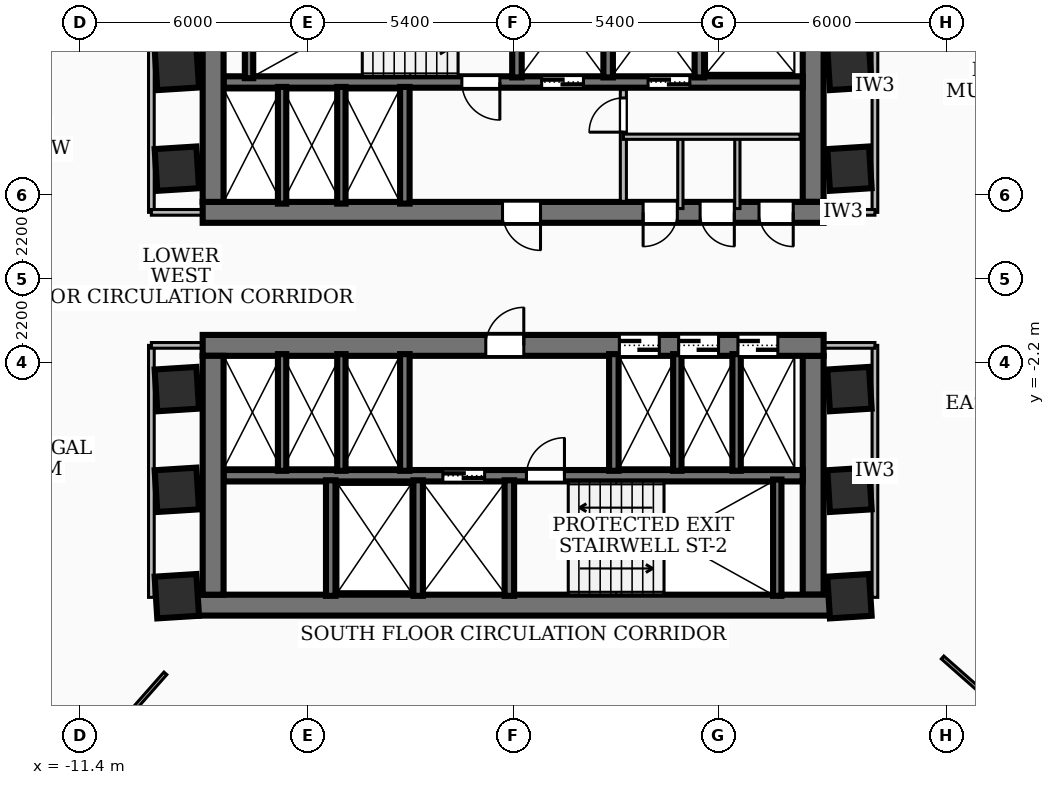
"""IFC4 building model, lengths in metres.
Left out: names, types, materials, properties, quantities, classifications, styles, units other than length and angle.
Written with IfcOpenShell. Run it as: python <this file> out.ifc"""

import sys

from ifc_helpers import new_model, si_unit, direction, frame, frame_2d, origin, origin_2d, place, context, subcontext, project, spatial, rectangle, extrude, element, fill, save


model = new_model("IFC4")
c1 = context("Model", 3, precision=1e-05, world=origin(), true_north=direction((0.0, 1.0)))
c2 = subcontext(c1, "Body", "Model", "MODEL_VIEW")
j1 = project(units=[si_unit("LENGTHUNIT", "METRE"), si_unit("PLANEANGLEUNIT", "RADIAN")], contexts=[c1])
p1 = place(None, origin())
s1 = spatial("IfcSite", under=j1, at=p1, CompositionType="ELEMENT")
p2 = place(p1, origin())
s2 = spatial("IfcBuilding", under=s1, at=p2, CompositionType="ELEMENT")
p3 = place(p2, frame((0.0, 0.0, 49.68)))
s3 = spatial("IfcBuildingStorey", under=s2, at=p3, CompositionType="ELEMENT", Elevation=49.68)
p4 = place(p3, frame((8.17, 1.75, 0.0), z_axis=(0.0, 0.0, 1.0), x_axis=(-1.0, 0.0, 0.0)))
e1 = element("IfcWall", 1, at=p4, inside=s3, PredefinedType="SHEAR", context=c2, shape_type="SweptSolid", body=[
    extrude(rectangle(XDim=16.34, YDim=0.55, at=frame_2d((8.17, 0.0))), origin(), (0.0, 0.0, 1.0), 3.32),
])
p5 = place(p4, frame((7.45, 0.0, 0.0)))
e2 = element("IfcOpeningElement", 2, at=p5, cuts=e1, PredefinedType="OPENING", context=c2, shape_type="SweptSolid", body=[
    extrude(rectangle(XDim=1.0, YDim=2.1, at=frame_2d((0.5, 1.05))), frame((0.0, 0.285, 0.0), z_axis=(0.0, -1.0, 0.0), x_axis=(1.0, 0.0, 0.0)), (0.0, 0.0, 1.0), 0.57),
])
p6 = place(p4, frame((3.85, 0.0, 0.0)))
e3 = element("IfcOpeningElement", 3, at=p6, cuts=e1, PredefinedType="OPENING", context=c2, shape_type="SweptSolid", body=[
    extrude(rectangle(XDim=0.9, YDim=2.06, at=frame_2d((0.45, 1.03))), frame((0.0, 0.285, 0.0), z_axis=(0.0, -1.0, 0.0), x_axis=(1.0, 0.0, 0.0)), (0.0, 0.0, 1.0), 0.57),
])
p7 = place(p4, frame((2.35, 0.0, 0.0)))
e4 = element("IfcOpeningElement", 4, at=p7, cuts=e1, PredefinedType="OPENING", context=c2, shape_type="SweptSolid", body=[
    extrude(rectangle(XDim=0.9, YDim=2.06, at=frame_2d((0.45, 1.03))), frame((0.0, 0.285, 0.0), z_axis=(0.0, -1.0, 0.0), x_axis=(1.0, 0.0, 0.0)), (0.0, 0.0, 1.0), 0.57),
])
p8 = place(p4, frame((0.8, 0.0, 0.0)))
e5 = element("IfcOpeningElement", 5, at=p8, cuts=e1, PredefinedType="OPENING", context=c2, shape_type="SweptSolid", body=[
    extrude(rectangle(XDim=0.9, YDim=2.06, at=frame_2d((0.45, 1.03))), frame((0.0, 0.285, 0.0), z_axis=(0.0, -1.0, 0.0), x_axis=(1.0, 0.0, 0.0)), (0.0, 0.0, 1.0), 0.57),
])
for number, where, z_axis, x_axis in (
    (6, (-7.895, 2.025, 0.0), (0.0, 0.0, 1.0), (0.0, 1.0, 0.0)),
    (7, (7.895, 8.31, 0.0), (0.0, 0.0, 1.0), (0.0, -1.0, 0.0)),
):
    element("IfcWall", number, at=place(p3, frame(where, z_axis=z_axis, x_axis=x_axis)), inside=s3, PredefinedType="SHEAR", context=c2, shape_type="SweptSolid", body=[
        extrude(rectangle(XDim=6.285, YDim=0.55, at=frame_2d((3.143, 0.0))), origin(), (0.0, 0.0, 1.0), 3.32),
    ])
p9 = place(p3, frame((7.62, 5.18, 0.0), z_axis=(0.0, 0.0, 1.0), x_axis=(-1.0, 0.0, 0.0)))
e8 = element("IfcWall", 8, at=p9, inside=s3, PredefinedType="SOLIDWALL", context=c2, shape_type="SweptSolid", body=[
    extrude(rectangle(XDim=15.24, YDim=0.3, at=frame_2d((7.62, 0.0))), origin(), (0.0, 0.0, 1.0), 3.32),
])
p10 = place(p9, frame((5.77, 0.0, 0.0)))
e9 = element("IfcOpeningElement", 9, at=p10, cuts=e8, PredefinedType="OPENING", context=c2, shape_type="SweptSolid", body=[
    extrude(rectangle(XDim=1.1, YDim=2.15, at=frame_2d((0.55, 1.075))), frame((0.0, 0.16, 0.0), z_axis=(0.0, -1.0, 0.0), x_axis=(1.0, 0.0, 0.0)), (0.0, 0.0, 1.0), 0.32),
])
p11 = place(p9, frame((2.97, 0.0, 0.0)))
e10 = element("IfcOpeningElement", 10, at=p11, cuts=e8, PredefinedType="OPENING", context=c2, shape_type="SweptSolid", body=[
    extrude(rectangle(XDim=1.1, YDim=2.15, at=frame_2d((0.55, 1.075))), frame((0.0, 0.16, 0.0), z_axis=(0.0, -1.0, 0.0), x_axis=(1.0, 0.0, 0.0)), (0.0, 0.0, 1.0), 0.32),
])
p12 = place(p9, frame((7.97, 0.0, 0.0)))
e11 = element("IfcOpeningElement", 11, at=p12, cuts=e8, PredefinedType="OPENING", context=c2, shape_type="SweptSolid", body=[
    extrude(rectangle(XDim=1.0, YDim=2.1, at=frame_2d((0.5, 1.05))), frame((0.0, 0.16, 0.0), z_axis=(0.0, -1.0, 0.0), x_axis=(1.0, 0.0, 0.0)), (0.0, 0.0, 1.0), 0.32),
])
p13 = place(p3, frame((8.78, -8.585, 0.0), z_axis=(0.0, 0.0, 1.0), x_axis=(-1.0, 0.0, 0.0)))
e12 = element("IfcWall", 12, at=p13, inside=s3, PredefinedType="SHEAR", context=c2, shape_type="SweptSolid", body=[
    extrude(rectangle(XDim=17.56, YDim=0.55, at=frame_2d((8.78, 0.0))), origin(), (0.0, 0.0, 1.0), 3.32),
])
p14 = place(p3, frame((-8.17, -1.75, 0.0), z_axis=(0.0, 0.0, 1.0), x_axis=(1.0, 0.0, 0.0)))
e13 = element("IfcWall", 13, at=p14, inside=s3, PredefinedType="SHEAR", context=c2, shape_type="SweptSolid", body=[
    extrude(rectangle(XDim=16.34, YDim=0.55, at=frame_2d((8.17, 0.0))), origin(), (0.0, 0.0, 1.0), 3.32),
])
p15 = place(p14, frame((7.45, 0.0, 0.0)))
e14 = element("IfcOpeningElement", 14, at=p15, cuts=e13, PredefinedType="OPENING", context=c2, shape_type="SweptSolid", body=[
    extrude(rectangle(XDim=1.0, YDim=2.1, at=frame_2d((0.5, 1.05))), frame((0.0, 0.285, 0.0), z_axis=(0.0, -1.0, 0.0), x_axis=(1.0, 0.0, 0.0)), (0.0, 0.0, 1.0), 0.57),
])
p16 = place(p14, frame((10.965, 0.0, 0.0)))
e15 = element("IfcOpeningElement", 15, at=p16, cuts=e13, PredefinedType="OPENING", context=c2, shape_type="SweptSolid", body=[
    extrude(rectangle(XDim=1.05, YDim=2.15, at=frame_2d((0.525, 1.075))), frame((0.0, 0.285, 0.0), z_axis=(0.0, -1.0, 0.0), x_axis=(1.0, 0.0, 0.0)), (0.0, 0.0, 1.0), 0.57),
])
p17 = place(p14, frame((12.525, 0.0, 0.0)))
e16 = element("IfcOpeningElement", 16, at=p17, cuts=e13, PredefinedType="OPENING", context=c2, shape_type="SweptSolid", body=[
    extrude(rectangle(XDim=1.05, YDim=2.15, at=frame_2d((0.525, 1.075))), frame((0.0, 0.285, 0.0), z_axis=(0.0, -1.0, 0.0), x_axis=(1.0, 0.0, 0.0)), (0.0, 0.0, 1.0), 0.57),
])
p18 = place(p14, frame((14.085, 0.0, 0.0)))
e17 = element("IfcOpeningElement", 17, at=p18, cuts=e13, PredefinedType="OPENING", context=c2, shape_type="SweptSolid", body=[
    extrude(rectangle(XDim=1.05, YDim=2.15, at=frame_2d((0.525, 1.075))), frame((0.0, 0.285, 0.0), z_axis=(0.0, -1.0, 0.0), x_axis=(1.0, 0.0, 0.0)), (0.0, 0.0, 1.0), 0.57),
])
for number, where, z_axis, x_axis in (
    (18, (-7.895, -8.31, 0.0), (0.0, 0.0, 1.0), (0.0, 1.0, 0.0)),
    (19, (7.895, -2.025, 0.0), (0.0, 0.0, 1.0), (0.0, -1.0, 0.0)),
):
    element("IfcWall", number, at=place(p3, frame(where, z_axis=z_axis, x_axis=x_axis)), inside=s3, PredefinedType="SHEAR", context=c2, shape_type="SweptSolid", body=[
        extrude(rectangle(XDim=6.285, YDim=0.55, at=frame_2d((3.143, 0.0))), origin(), (0.0, 0.0, 1.0), 3.32),
    ])
p19 = place(p3, frame((-7.62, -5.18, 0.0), z_axis=(0.0, 0.0, 1.0), x_axis=(1.0, 0.0, 0.0)))
e20 = element("IfcWall", 20, at=p19, inside=s3, PredefinedType="SOLIDWALL", context=c2, shape_type="SweptSolid", body=[
    extrude(rectangle(XDim=15.24, YDim=0.3, at=frame_2d((7.62, 0.0))), origin(), (0.0, 0.0, 1.0), 3.32),
])
p20 = place(p19, frame((5.77, 0.0, 0.0)))
e21 = element("IfcOpeningElement", 21, at=p20, cuts=e20, PredefinedType="OPENING", context=c2, shape_type="SweptSolid", body=[
    extrude(rectangle(XDim=1.1, YDim=2.15, at=frame_2d((0.55, 1.075))), frame((0.0, 0.16, 0.0), z_axis=(0.0, -1.0, 0.0), x_axis=(1.0, 0.0, 0.0)), (0.0, 0.0, 1.0), 0.32),
])
p21 = place(p19, frame((7.97, 0.0, 0.0)))
e22 = element("IfcOpeningElement", 22, at=p21, cuts=e20, PredefinedType="OPENING", context=c2, shape_type="SweptSolid", body=[
    extrude(rectangle(XDim=1.0, YDim=2.1, at=frame_2d((0.5, 1.05))), frame((0.0, 0.16, 0.0), z_axis=(0.0, -1.0, 0.0), x_axis=(1.0, 0.0, 0.0)), (0.0, 0.0, 1.0), 0.32),
])
for number, where, z_axis, x_axis in (
    (23, (-6.95, 5.28, 0.0), (0.0, 0.0, 1.0), (0.0, 1.0, 0.0)),
    (24, (6.95, -8.34, 0.0), (0.0, 0.0, 1.0), (0.0, 1.0, 0.0)),
):
    element("IfcWall", number, at=place(p3, frame(where, z_axis=z_axis, x_axis=x_axis)), inside=s3, PredefinedType="SOLIDWALL", context=c2, shape_type="SweptSolid", body=[
        extrude(rectangle(XDim=3.06, YDim=0.22, at=frame_2d((1.53, 0.0))), origin(), (0.0, 0.0, 1.0), 3.32),
    ])
for number, where, z_axis, x_axis in (
    (25, (0.1, 5.3, 0.0), (0.0, 0.0, 1.0), (0.0, 1.0, 0.0)),
    (26, (2.5, 5.3, 0.0), (0.0, 0.0, 1.0), (0.0, 1.0, 0.0)),
    (27, (4.9, 5.3, 0.0), (0.0, 0.0, 1.0), (0.0, 1.0, 0.0)),
):
    element("IfcWall", number, at=place(p3, frame(where, z_axis=z_axis, x_axis=x_axis)), inside=s3, PredefinedType="SOLIDWALL", context=c2, shape_type="SweptSolid", body=[
        extrude(rectangle(XDim=3.04, YDim=0.25, at=frame_2d((1.52, 0.0))), origin(), (0.0, 0.0, 1.0), 3.32),
    ])
p22 = place(p3, frame((-2.85, 1.98, 0.0), z_axis=(0.0, 0.0, 1.0), x_axis=(0.0, 1.0, 0.0)))
e28 = element("IfcWall", 28, at=p22, inside=s3, PredefinedType="SOLIDWALL", context=c2, shape_type="SweptSolid", body=[
    extrude(rectangle(XDim=3.07, YDim=0.25, at=frame_2d((1.535, 0.0))), origin(), (0.0, 0.0, 1.0), 3.32),
])
for number, where, z_axis, x_axis in (
    (29, (-0.1, -8.34, 0.0), (0.0, 0.0, 1.0), (0.0, 1.0, 0.0)),
    (30, (-2.5, -8.34, 0.0), (0.0, 0.0, 1.0), (0.0, 1.0, 0.0)),
    (31, (-4.8, -8.34, 0.0), (0.0, 0.0, 1.0), (0.0, 1.0, 0.0)),
):
    element("IfcWall", number, at=place(p3, frame(where, z_axis=z_axis, x_axis=x_axis)), inside=s3, PredefinedType="SOLIDWALL", context=c2, shape_type="SweptSolid", body=[
        extrude(rectangle(XDim=3.04, YDim=0.25, at=frame_2d((1.52, 0.0))), origin(), (0.0, 0.0, 1.0), 3.32),
    ])
for number, where, z_axis, x_axis in (
    (32, (-2.85, -5.05, 0.0), (0.0, 0.0, 1.0), (0.0, 1.0, 0.0)),
    (33, (2.65, -5.05, 0.0), (0.0, 0.0, 1.0), (0.0, 1.0, 0.0)),
):
    element("IfcWall", number, at=place(p3, frame(where, z_axis=z_axis, x_axis=x_axis)), inside=s3, PredefinedType="SOLIDWALL", context=c2, shape_type="SweptSolid", body=[
        extrude(rectangle(XDim=3.07, YDim=0.25, at=frame_2d((1.535, 0.0))), origin(), (0.0, 0.0, 1.0), 3.32),
    ])
for number, where, z_axis, x_axis in (
    (34, (-6.08, 1.98, 0.0), (0.0, 0.0, 1.0), (0.0, 1.0, 0.0)),
    (35, (-4.52, 1.98, 0.0), (0.0, 0.0, 1.0), (0.0, 1.0, 0.0)),
    (36, (4.32, -5.05, 0.0), (0.0, 0.0, 1.0), (0.0, 1.0, 0.0)),
    (37, (5.88, -5.05, 0.0), (0.0, 0.0, 1.0), (0.0, 1.0, 0.0)),
    (38, (-6.08, -5.05, 0.0), (0.0, 0.0, 1.0), (0.0, 1.0, 0.0)),
    (39, (-4.52, -5.05, 0.0), (0.0, 0.0, 1.0), (0.0, 1.0, 0.0)),
):
    element("IfcWall", number, at=place(p3, frame(where, z_axis=z_axis, x_axis=x_axis)), inside=s3, PredefinedType="SOLIDWALL", context=c2, shape_type="SweptSolid", body=[
        extrude(rectangle(XDim=3.07, YDim=0.22, at=frame_2d((1.535, 0.0))), origin(), (0.0, 0.0, 1.0), 3.32),
    ])
for number, where, z_axis, x_axis in (
    (40, (-8.85, -5.55, 0.0), (0.0, 0.0, 1.0), (0.998, 0.063, 0.0)),
    (41, (-8.85, -2.9, 0.0), (0.0, 0.0, 1.0), (0.998, 0.063, 0.0)),
    (42, (-8.85, 2.9, 0.0), (0.0, 0.0, 1.0), (0.998, 0.063, 0.0)),
    (43, (-8.85, 5.55, 0.0), (0.0, 0.0, 1.0), (0.998, 0.063, 0.0)),
    (44, (8.85, -5.55, 0.0), (0.0, 0.0, 1.0), (0.998, 0.063, 0.0)),
    (45, (8.85, -2.9, 0.0), (0.0, 0.0, 1.0), (0.998, 0.063, 0.0)),
    (46, (8.85, 2.9, 0.0), (0.0, 0.0, 1.0), (0.998, 0.063, 0.0)),
    (47, (8.85, 5.55, 0.0), (0.0, 0.0, 1.0), (0.998, 0.063, 0.0)),
    (48, (8.85, -8.35, 0.0), (0.0, 0.0, 1.0), (0.998, 0.063, 0.0)),
    (49, (-8.85, -8.35, 0.0), (0.0, 0.0, 1.0), (0.998, 0.063, 0.0)),
):
    element("IfcColumn", number, at=place(p3, frame(where, z_axis=z_axis, x_axis=x_axis)), inside=s3, PredefinedType="COLUMN", context=c2, shape_type="SweptSolid", body=[
        extrude(rectangle(XDim=1.1, YDim=1.1, at=origin_2d()), origin(), (0.0, 0.0, 1.0), 3.6),
    ])
p23 = place(p3, frame((2.9, 2.04, 0.0), z_axis=(0.0, 0.0, 1.0), x_axis=(0.0, 1.0, 0.0)))
e50 = element("IfcWall", 50, at=p23, inside=s3, PredefinedType="PARTITIONING", context=c2, shape_type="SweptSolid", body=[
    extrude(rectangle(XDim=2.94, YDim=0.16, at=frame_2d((1.47, 0.0))), origin(), (0.0, 0.0, 1.0), 2.385),
])
p24 = place(p23, frame((1.82, 0.0, 0.0)))
e51 = element("IfcOpeningElement", 51, at=p24, cuts=e50, PredefinedType="OPENING", context=c2, shape_type="SweptSolid", body=[
    extrude(rectangle(XDim=0.9, YDim=2.06, at=frame_2d((0.45, 1.03))), frame((0.0, 0.09, 0.0), z_axis=(0.0, -1.0, 0.0), x_axis=(1.0, 0.0, 0.0)), (0.0, 0.0, 1.0), 0.18),
])
p25 = place(p3, frame((2.9, 3.74, 0.0), z_axis=(0.0, 0.0, 1.0), x_axis=(1.0, 0.0, 0.0)))
e52 = element("IfcWall", 52, at=p25, inside=s3, PredefinedType="PARTITIONING", context=c2, shape_type="SweptSolid", body=[
    extrude(rectangle(XDim=4.65, YDim=0.138, at=frame_2d((2.325, 0.0))), origin(), (0.0, 0.0, 1.0), 3.32),
])
for number, where, z_axis, x_axis in (
    (53, (4.4, 1.85, 0.0), (0.0, 0.0, 1.0), (0.0, 1.0, 0.0)),
    (54, (5.9, 1.85, 0.0), (0.0, 0.0, 1.0), (0.0, 1.0, 0.0)),
):
    element("IfcWall", number, at=place(p3, frame(where, z_axis=z_axis, x_axis=x_axis)), inside=s3, PredefinedType="PARTITIONING", context=c2, shape_type="SweptSolid", body=[
        extrude(rectangle(XDim=1.89, YDim=0.138, at=frame_2d((0.945, 0.0))), origin(), (0.0, 0.0, 1.0), 2.385),
    ])
p26 = place(p3, frame((-9.52, 1.75, 0.0), z_axis=(0.0, 0.0, 1.0), x_axis=(0.0, 1.0, 0.0)))
e55 = element("IfcWall", 55, at=p26, inside=s3, PredefinedType="PARTITIONING", context=c2, shape_type="SweptSolid", body=[
    extrude(rectangle(XDim=6.63, YDim=0.15, at=frame_2d((3.315, 0.0))), origin(), (0.0, 0.0, 1.0), 2.401),
])
p27 = place(p3, frame((-7.85, 1.75, 0.0), z_axis=(0.0, 0.0, 1.0), x_axis=(-1.0, 0.0, 0.0)))
e56 = element("IfcWall", 56, at=p27, inside=s3, PredefinedType="PARTITIONING", context=c2, shape_type="SweptSolid", body=[
    extrude(rectangle(XDim=1.67, YDim=0.15, at=frame_2d((0.835, 0.0))), origin(), (0.0, 0.0, 1.0), 2.385),
])
p28 = place(p3, frame((-9.52, -8.38, 0.0), z_axis=(0.0, 0.0, 1.0), x_axis=(0.0, 1.0, 0.0)))
e57 = element("IfcWall", 57, at=p28, inside=s3, PredefinedType="PARTITIONING", context=c2, shape_type="SweptSolid", body=[
    extrude(rectangle(XDim=6.63, YDim=0.15, at=frame_2d((3.315, 0.0))), origin(), (0.0, 0.0, 1.0), 2.401),
])
p29 = place(p3, frame((-7.85, -1.75, 0.0), z_axis=(0.0, 0.0, 1.0), x_axis=(-1.0, 0.0, 0.0)))
e58 = element("IfcWall", 58, at=p29, inside=s3, PredefinedType="PARTITIONING", context=c2, shape_type="SweptSolid", body=[
    extrude(rectangle(XDim=1.67, YDim=0.15, at=frame_2d((0.835, 0.0))), origin(), (0.0, 0.0, 1.0), 2.385),
])
p30 = place(p3, frame((9.52, 1.75, 0.0), z_axis=(0.0, 0.0, 1.0), x_axis=(0.0, 1.0, 0.0)))
e59 = element("IfcWall", 59, at=p30, inside=s3, PredefinedType="PARTITIONING", context=c2, shape_type="SweptSolid", body=[
    extrude(rectangle(XDim=6.63, YDim=0.15, at=frame_2d((3.315, 0.0))), origin(), (0.0, 0.0, 1.0), 2.401),
])
p31 = place(p3, frame((7.85, 1.75, 0.0), z_axis=(0.0, 0.0, 1.0), x_axis=(1.0, 0.0, 0.0)))
e60 = element("IfcWall", 60, at=p31, inside=s3, PredefinedType="PARTITIONING", context=c2, shape_type="SweptSolid", body=[
    extrude(rectangle(XDim=1.67, YDim=0.15, at=frame_2d((0.835, 0.0))), origin(), (0.0, 0.0, 1.0), 2.385),
])
p32 = place(p3, frame((9.52, -8.38, 0.0), z_axis=(0.0, 0.0, 1.0), x_axis=(0.0, 1.0, 0.0)))
e61 = element("IfcWall", 61, at=p32, inside=s3, PredefinedType="PARTITIONING", context=c2, shape_type="SweptSolid", body=[
    extrude(rectangle(XDim=6.63, YDim=0.15, at=frame_2d((3.315, 0.0))), origin(), (0.0, 0.0, 1.0), 2.401),
])
p33 = place(p3, frame((7.85, -1.75, 0.0), z_axis=(0.0, 0.0, 1.0), x_axis=(1.0, 0.0, 0.0)))
e62 = element("IfcWall", 62, at=p33, inside=s3, PredefinedType="PARTITIONING", context=c2, shape_type="SweptSolid", body=[
    extrude(rectangle(XDim=1.67, YDim=0.15, at=frame_2d((0.835, 0.0))), origin(), (0.0, 0.0, 1.0), 2.385),
])
p34 = place(p3, frame((-9.151, -10.38, 0.0), z_axis=(0.0, 0.0, 1.0), x_axis=(-0.661373124857, -0.750057057641, 0.0)))
e63 = element("IfcWall", 63, at=p34, inside=s3, PredefinedType="PARTITIONING", context=c2, shape_type="SweptSolid", body=[
    extrude(rectangle(XDim=5.817, YDim=0.1, at=frame_2d((2.908, 0.0))), origin(), (0.0, 0.0, 1.0), 2.624),
])
p35 = place(p3, frame((11.3, -9.962, 0.0), z_axis=(0.0, 0.0, 1.0), x_axis=(0.750020974917, -0.661414043686, 0.0)))
e64 = element("IfcWall", 64, at=p35, inside=s3, PredefinedType="PARTITIONING", context=c2, shape_type="SweptSolid", body=[
    extrude(rectangle(XDim=4.59, YDim=0.1, at=frame_2d((2.295, 0.0))), origin(), (0.0, 0.0, 1.0), 3.32),
])
p36 = place(p5, origin())
e65 = element("IfcDoor", 65, at=p36, inside=s3, OperationType="SINGLE_SWING_LEFT", PredefinedType="DOOR", context=c2, shape_type="SweptSolid", body=[
    extrude(rectangle(XDim=1.0, YDim=2.1, at=frame_2d((0.5, 1.05))), frame((0.0, 0.025, 0.0), z_axis=(0.0, -1.0, 0.0), x_axis=(1.0, 0.0, 0.0)), (0.0, 0.0, 1.0), 0.05),
])
fill(e2, e65)
p37 = place(p15, origin())
e66 = element("IfcDoor", 66, at=p37, inside=s3, OperationType="SINGLE_SWING_RIGHT", PredefinedType="DOOR", context=c2, shape_type="SweptSolid", body=[
    extrude(rectangle(XDim=1.0, YDim=2.1, at=frame_2d((0.5, 1.05))), frame((0.0, 0.025, 0.0), z_axis=(0.0, -1.0, 0.0), x_axis=(1.0, 0.0, 0.0)), (0.0, 0.0, 1.0), 0.05),
])
fill(e14, e66)
p38 = place(p10, origin())
e67 = element("IfcDoor", 67, at=p38, inside=s3, OperationType="DOUBLE_DOOR_SLIDING", PredefinedType="DOOR", context=c2, shape_type="SweptSolid", body=[
    extrude(rectangle(XDim=1.1, YDim=2.15, at=frame_2d((0.55, 1.075))), frame((0.0, 0.025, 0.0), z_axis=(0.0, -1.0, 0.0), x_axis=(1.0, 0.0, 0.0)), (0.0, 0.0, 1.0), 0.05),
])
fill(e9, e67)
p39 = place(p11, origin())
e68 = element("IfcDoor", 68, at=p39, inside=s3, OperationType="DOUBLE_DOOR_SLIDING", PredefinedType="DOOR", context=c2, shape_type="SweptSolid", body=[
    extrude(rectangle(XDim=1.1, YDim=2.15, at=frame_2d((0.55, 1.075))), frame((0.0, 0.025, 0.0), z_axis=(0.0, -1.0, 0.0), x_axis=(1.0, 0.0, 0.0)), (0.0, 0.0, 1.0), 0.05),
])
fill(e10, e68)
p40 = place(p12, origin())
e69 = element("IfcDoor", 69, at=p40, inside=s3, OperationType="SINGLE_SWING_LEFT", PredefinedType="DOOR", context=c2, shape_type="SweptSolid", body=[
    extrude(rectangle(XDim=1.0, YDim=2.1, at=frame_2d((0.5, 1.05))), frame((0.0, 0.025, 0.0), z_axis=(0.0, -1.0, 0.0), x_axis=(1.0, 0.0, 0.0)), (0.0, 0.0, 1.0), 0.05),
])
fill(e11, e69)
p41 = place(p20, origin())
e70 = element("IfcDoor", 70, at=p41, inside=s3, OperationType="DOUBLE_DOOR_SLIDING", PredefinedType="DOOR", context=c2, shape_type="SweptSolid", body=[
    extrude(rectangle(XDim=1.1, YDim=2.15, at=frame_2d((0.55, 1.075))), frame((0.0, 0.025, 0.0), z_axis=(0.0, -1.0, 0.0), x_axis=(1.0, 0.0, 0.0)), (0.0, 0.0, 1.0), 0.05),
])
fill(e21, e70)
p42 = place(p21, origin())
e71 = element("IfcDoor", 71, at=p42, inside=s3, OperationType="SINGLE_SWING_RIGHT", PredefinedType="DOOR", context=c2, shape_type="SweptSolid", body=[
    extrude(rectangle(XDim=1.0, YDim=2.1, at=frame_2d((0.5, 1.05))), frame((0.0, 0.025, 0.0), z_axis=(0.0, -1.0, 0.0), x_axis=(1.0, 0.0, 0.0)), (0.0, 0.0, 1.0), 0.05),
])
fill(e22, e71)
p43 = place(p16, origin())
e72 = element("IfcDoor", 72, at=p43, inside=s3, OperationType="DOUBLE_DOOR_SLIDING", PredefinedType="DOOR", context=c2, shape_type="SweptSolid", body=[
    extrude(rectangle(XDim=1.05, YDim=2.15, at=frame_2d((0.525, 1.075))), frame((0.0, 0.025, 0.0), z_axis=(0.0, -1.0, 0.0), x_axis=(1.0, 0.0, 0.0)), (0.0, 0.0, 1.0), 0.05),
])
fill(e15, e72)
p44 = place(p17, origin())
e73 = element("IfcDoor", 73, at=p44, inside=s3, OperationType="DOUBLE_DOOR_SLIDING", PredefinedType="DOOR", context=c2, shape_type="SweptSolid", body=[
    extrude(rectangle(XDim=1.05, YDim=2.15, at=frame_2d((0.525, 1.075))), frame((0.0, 0.025, 0.0), z_axis=(0.0, -1.0, 0.0), x_axis=(1.0, 0.0, 0.0)), (0.0, 0.0, 1.0), 0.05),
])
fill(e16, e73)
p45 = place(p18, origin())
e74 = element("IfcDoor", 74, at=p45, inside=s3, OperationType="DOUBLE_DOOR_SLIDING", PredefinedType="DOOR", context=c2, shape_type="SweptSolid", body=[
    extrude(rectangle(XDim=1.05, YDim=2.15, at=frame_2d((0.525, 1.075))), frame((0.0, 0.025, 0.0), z_axis=(0.0, -1.0, 0.0), x_axis=(1.0, 0.0, 0.0)), (0.0, 0.0, 1.0), 0.05),
])
fill(e17, e74)
p46 = place(p6, origin())
e75 = element("IfcDoor", 75, at=p46, inside=s3, OperationType="SINGLE_SWING_RIGHT", PredefinedType="DOOR", context=c2, shape_type="SweptSolid", body=[
    extrude(rectangle(XDim=0.9, YDim=2.06, at=frame_2d((0.45, 1.03))), frame((0.0, 0.025, 0.0), z_axis=(0.0, -1.0, 0.0), x_axis=(1.0, 0.0, 0.0)), (0.0, 0.0, 1.0), 0.05),
])
fill(e3, e75)
p47 = place(p7, origin())
e76 = element("IfcDoor", 76, at=p47, inside=s3, OperationType="SINGLE_SWING_LEFT", PredefinedType="DOOR", context=c2, shape_type="SweptSolid", body=[
    extrude(rectangle(XDim=0.9, YDim=2.06, at=frame_2d((0.45, 1.03))), frame((0.0, 0.025, 0.0), z_axis=(0.0, -1.0, 0.0), x_axis=(1.0, 0.0, 0.0)), (0.0, 0.0, 1.0), 0.05),
])
fill(e4, e76)
p48 = place(p8, origin())
e77 = element("IfcDoor", 77, at=p48, inside=s3, OperationType="SINGLE_SWING_LEFT", PredefinedType="DOOR", context=c2, shape_type="SweptSolid", body=[
    extrude(rectangle(XDim=0.9, YDim=2.06, at=frame_2d((0.45, 1.03))), frame((0.0, 0.025, 0.0), z_axis=(0.0, -1.0, 0.0), x_axis=(1.0, 0.0, 0.0)), (0.0, 0.0, 1.0), 0.05),
])
fill(e5, e77)
p49 = place(p24, origin())
e78 = element("IfcDoor", 78, at=p49, inside=s3, OperationType="SINGLE_SWING_LEFT", PredefinedType="DOOR", context=c2, shape_type="SweptSolid", body=[
    extrude(rectangle(XDim=0.9, YDim=2.06, at=frame_2d((0.45, 1.03))), frame((0.0, 0.025, 0.0), z_axis=(0.0, -1.0, 0.0), x_axis=(1.0, 0.0, 0.0)), (0.0, 0.0, 1.0), 0.05),
])
fill(e51, e78)
save(model, sys.argv[1])
